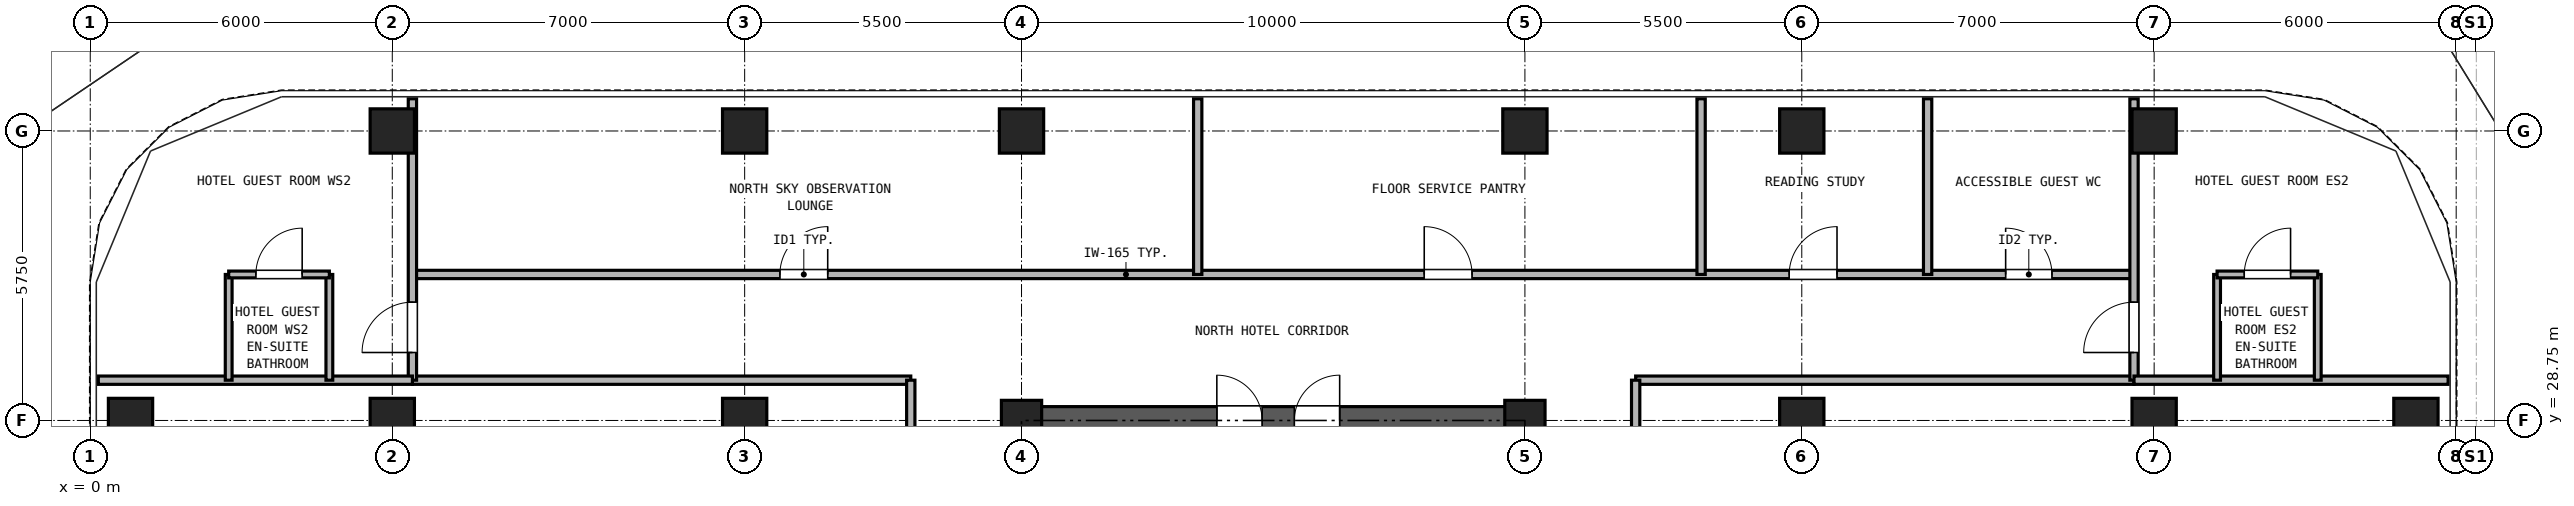
"""IFC4 building model, lengths in metres.
Left out: names, types, materials, properties, quantities, classifications, styles, units other than length and angle.
Written with IfcOpenShell. Run it as: python <this file> out.ifc"""

import sys

from ifc_helpers import new_model, si_unit, direction, frame, frame_2d, origin, origin_2d, place, context, subcontext, project, spatial, rectangle, hollow_rectangle, extrude, source, transform, mapped, element, fill, save


model = new_model("IFC4")
c1 = context("Model", 3, precision=1e-05, world=origin(), true_north=direction((0.0, 1.0)))
c2 = subcontext(c1, "Body", "Model", "MODEL_VIEW")
j1 = project(units=[si_unit("LENGTHUNIT", "METRE"), si_unit("PLANEANGLEUNIT", "RADIAN")], contexts=[c1])
p1 = place(None, origin())
s1 = spatial("IfcSite", under=j1, at=p1, CompositionType="ELEMENT")
p2 = place(p1, origin())
s2 = spatial("IfcBuilding", under=s1, at=p2, CompositionType="ELEMENT")
p3 = place(p2, frame((0.0, 0.0, 105.5)))
s3 = spatial("IfcBuildingStorey", under=s2, at=p3, CompositionType="ELEMENT", Elevation=105.5)
m1 = source(origin(), c2, "Body", "SweptSolid", [
    extrude(hollow_rectangle(XDim=0.88, YDim=0.88, WallThickness=0.05, at=origin_2d()), origin(), (0.0, 0.0, 1.0), 2.95),
])
for number, where, z_axis, x_axis in (
    (1, (6.0, 34.5, 0.0), (0.0, 0.0, 1.0), (1.0, 0.0, 0.0)),
    (2, (13.0, 34.5, 0.0), (0.0, 0.0, 1.0), (1.0, 0.0, 0.0)),
    (3, (18.5, 34.5, 0.0), (0.0, 0.0, 1.0), (1.0, 0.0, 0.0)),
    (4, (28.5, 34.5, 0.0), (0.0, 0.0, 1.0), (1.0, 0.0, 0.0)),
    (5, (34.0, 34.5, 0.0), (0.0, 0.0, 1.0), (1.0, 0.0, 0.0)),
    (6, (41.0, 34.5, 0.0), (0.0, 0.0, 1.0), (1.0, 0.0, 0.0)),
    (7, (0.8, 28.75, 0.0), (0.0, 0.0, 1.0), (1.0, 0.0, 0.0)),
    (8, (46.2, 28.75, 0.0), (0.0, 0.0, 1.0), (1.0, 0.0, 0.0)),
    (9, (6.0, 28.75, 0.0), (0.0, 0.0, 1.0), (1.0, 0.0, 0.0)),
    (10, (13.0, 28.75, 0.0), (0.0, 0.0, 1.0), (1.0, 0.0, 0.0)),
):
    element("IfcColumn", number, at=place(p3, frame(where, z_axis=z_axis, x_axis=x_axis)), inside=s3, PredefinedType="COLUMN", context=c2, shape_type="MappedRepresentation", body=[
        mapped(m1, transform((0.0, 0.0, 0.0), x_axis=(1.0, 0.0, 0.0), y_axis=(0.0, 1.0, 0.0), z_axis=(0.0, 0.0, 1.0), scale=1.0)),
    ])
m2 = source(origin(), c2, "Body", "SweptSolid", [
    extrude(hollow_rectangle(XDim=0.8, YDim=0.8, WallThickness=0.045, at=origin_2d()), origin(), (0.0, 0.0, 1.0), 2.95),
])
for number, where, z_axis, x_axis in (
    (11, (18.5, 28.75, 0.0), (0.0, 0.0, 1.0), (1.0, 0.0, 0.0)),
    (12, (28.5, 28.75, 0.0), (0.0, 0.0, 1.0), (1.0, 0.0, 0.0)),
):
    element("IfcColumn", number, at=place(p3, frame(where, z_axis=z_axis, x_axis=x_axis)), inside=s3, PredefinedType="COLUMN", context=c2, shape_type="MappedRepresentation", body=[
        mapped(m2, transform((0.0, 0.0, 0.0), x_axis=(1.0, 0.0, 0.0), y_axis=(0.0, 1.0, 0.0), z_axis=(0.0, 0.0, 1.0), scale=1.0)),
    ])
for number, where, z_axis, x_axis in (
    (13, (34.0, 28.75, 0.0), (0.0, 0.0, 1.0), (1.0, 0.0, 0.0)),
    (14, (41.0, 28.75, 0.0), (0.0, 0.0, 1.0), (1.0, 0.0, 0.0)),
):
    element("IfcColumn", number, at=place(p3, frame(where, z_axis=z_axis, x_axis=x_axis)), inside=s3, PredefinedType="COLUMN", context=c2, shape_type="MappedRepresentation", body=[
        mapped(m1, transform((0.0, 0.0, 0.0), x_axis=(1.0, 0.0, 0.0), y_axis=(0.0, 1.0, 0.0), z_axis=(0.0, 0.0, 1.0), scale=1.0)),
    ])
p4 = place(p3, frame((18.225, 28.75, 0.0), z_axis=(0.0, 0.0, 1.0), x_axis=(1.0, 0.0, 0.0)))
e15 = element("IfcWall", 15, at=p4, inside=s3, PredefinedType="SHEAR", context=c2, shape_type="SweptSolid", body=[
    extrude(rectangle(XDim=10.55, YDim=0.55, at=frame_2d((5.275, 0.0))), origin(), (0.0, 0.0, 1.0), 2.95),
])
p5 = place(p4, frame((4.155, 0.0, 0.0)))
e16 = element("IfcOpeningElement", 16, at=p5, cuts=e15, PredefinedType="OPENING", context=c2, shape_type="SweptSolid", body=[
    extrude(rectangle(XDim=0.9, YDim=2.05, at=frame_2d((0.45, 1.025))), frame((0.0, 0.285, 0.0), z_axis=(0.0, -1.0, 0.0), x_axis=(1.0, 0.0, 0.0)), (0.0, 0.0, 1.0), 0.57),
])
p6 = place(p4, frame((5.695, 0.0, 0.0)))
e17 = element("IfcOpeningElement", 17, at=p6, cuts=e15, PredefinedType="OPENING", context=c2, shape_type="SweptSolid", body=[
    extrude(rectangle(XDim=0.9, YDim=2.05, at=frame_2d((0.45, 1.025))), frame((0.0, 0.285, 0.0), z_axis=(0.0, -1.0, 0.0), x_axis=(1.0, 0.0, 0.0)), (0.0, 0.0, 1.0), 0.57),
])
p7 = place(p3, frame((6.4, 31.65, 0.0), z_axis=(0.0, 0.0, 1.0), x_axis=(1.0, 0.0, 0.0)))
e18 = element("IfcWall", 18, at=p7, inside=s3, PredefinedType="PARTITIONING", context=c2, shape_type="SweptSolid", body=[
    extrude(rectangle(XDim=34.2, YDim=0.165, at=frame_2d((17.1, 0.0))), origin(), (0.0, 0.0, 1.0), 2.583),
])
p8 = place(p7, frame((7.3, 0.0, 0.0)))
e19 = element("IfcOpeningElement", 19, at=p8, cuts=e18, PredefinedType="OPENING", context=c2, shape_type="SweptSolid", body=[
    extrude(rectangle(XDim=0.95, YDim=2.15, at=frame_2d((0.475, 1.075))), frame((0.0, 0.093, 0.0), z_axis=(0.0, -1.0, 0.0), x_axis=(1.0, 0.0, 0.0)), (0.0, 0.0, 1.0), 0.185),
])
p9 = place(p7, frame((20.1, 0.0, 0.0)))
e20 = element("IfcOpeningElement", 20, at=p9, cuts=e18, PredefinedType="OPENING", context=c2, shape_type="SweptSolid", body=[
    extrude(rectangle(XDim=0.95, YDim=2.15, at=frame_2d((0.475, 1.075))), frame((0.0, 0.093, 0.0), z_axis=(0.0, -1.0, 0.0), x_axis=(1.0, 0.0, 0.0)), (0.0, 0.0, 1.0), 0.185),
])
p10 = place(p7, frame((27.35, 0.0, 0.0)))
e21 = element("IfcOpeningElement", 21, at=p10, cuts=e18, PredefinedType="OPENING", context=c2, shape_type="SweptSolid", body=[
    extrude(rectangle(XDim=0.95, YDim=2.15, at=frame_2d((0.475, 1.075))), frame((0.0, 0.093, 0.0), z_axis=(0.0, -1.0, 0.0), x_axis=(1.0, 0.0, 0.0)), (0.0, 0.0, 1.0), 0.185),
])
p11 = place(p7, frame((31.65, 0.0, 0.0)))
e22 = element("IfcOpeningElement", 22, at=p11, cuts=e18, PredefinedType="OPENING", context=c2, shape_type="SweptSolid", body=[
    extrude(rectangle(XDim=0.92, YDim=2.1, at=frame_2d((0.46, 1.05))), frame((0.0, 0.093, 0.0), z_axis=(0.0, -1.0, 0.0), x_axis=(1.0, 0.0, 0.0)), (0.0, 0.0, 1.0), 0.185),
])
for number, where, z_axis, x_axis in (
    (23, (6.4, 29.55, 0.0), (0.0, 0.0, 1.0), (1.0, 0.0, 0.0)),
    (24, (30.7, 29.55, 0.0), (0.0, 0.0, 1.0), (1.0, 0.0, 0.0)),
):
    element("IfcWall", number, at=place(p3, frame(where, z_axis=z_axis, x_axis=x_axis)), inside=s3, PredefinedType="PARTITIONING", context=c2, shape_type="SweptSolid", body=[
        extrude(rectangle(XDim=9.9, YDim=0.165, at=frame_2d((4.95, 0.0))), origin(), (0.0, 0.0, 1.0), 2.95),
    ])
p12 = place(p3, frame((16.3, 11.1, 0.0), z_axis=(0.0, 0.0, 1.0), x_axis=(0.0, 1.0, 0.0)))
e25 = element("IfcWall", 25, at=p12, inside=s3, PredefinedType="PARTITIONING", context=c2, shape_type="SweptSolid", body=[
    extrude(rectangle(XDim=18.45, YDim=0.165, at=frame_2d((9.225, 0.0))), origin(), (0.0, 0.0, 1.0), 2.95),
])
p13 = place(p12, frame((2.5, 0.0, 0.0)))
e26 = element("IfcOpeningElement", 26, at=p13, cuts=e25, PredefinedType="OPENING", context=c2, shape_type="SweptSolid", body=[
    extrude(rectangle(XDim=0.95, YDim=2.15, at=frame_2d((0.475, 1.075))), frame((0.0, 0.093, 0.0), z_axis=(0.0, -1.0, 0.0), x_axis=(1.0, 0.0, 0.0)), (0.0, 0.0, 1.0), 0.185),
])
p14 = place(p12, frame((8.5, 0.0, 0.0)))
e27 = element("IfcOpeningElement", 27, at=p14, cuts=e25, PredefinedType="OPENING", context=c2, shape_type="SweptSolid", body=[
    extrude(rectangle(XDim=0.95, YDim=2.15, at=frame_2d((0.475, 1.075))), frame((0.0, 0.093, 0.0), z_axis=(0.0, -1.0, 0.0), x_axis=(1.0, 0.0, 0.0)), (0.0, 0.0, 1.0), 0.185),
])
p15 = place(p12, frame((14.725, 0.0, 0.0)))
e28 = element("IfcOpeningElement", 28, at=p15, cuts=e25, PredefinedType="OPENING", context=c2, shape_type="SweptSolid", body=[
    extrude(rectangle(XDim=0.95, YDim=2.15, at=frame_2d((0.475, 1.075))), frame((0.0, 0.093, 0.0), z_axis=(0.0, -1.0, 0.0), x_axis=(1.0, 0.0, 0.0)), (0.0, 0.0, 1.0), 0.185),
])
p16 = place(p3, frame((30.7, 11.1, 0.0), z_axis=(0.0, 0.0, 1.0), x_axis=(0.0, 1.0, 0.0)))
e29 = element("IfcWall", 29, at=p16, inside=s3, PredefinedType="PARTITIONING", context=c2, shape_type="SweptSolid", body=[
    extrude(rectangle(XDim=18.45, YDim=0.165, at=frame_2d((9.225, 0.0))), origin(), (0.0, 0.0, 1.0), 2.95),
])
p17 = place(p16, frame((4.112, 0.0, 0.0)))
e30 = element("IfcOpeningElement", 30, at=p17, cuts=e29, PredefinedType="OPENING", context=c2, shape_type="SweptSolid", body=[
    extrude(rectangle(XDim=0.95, YDim=2.15, at=frame_2d((0.475, 1.075))), frame((0.0, 0.093, 0.0), z_axis=(0.0, -1.0, 0.0), x_axis=(1.0, 0.0, 0.0)), (0.0, 0.0, 1.0), 0.185),
])
p18 = place(p16, frame((13.338, 0.0, 0.0)))
e31 = element("IfcOpeningElement", 31, at=p18, cuts=e29, PredefinedType="OPENING", context=c2, shape_type="SweptSolid", body=[
    extrude(rectangle(XDim=0.95, YDim=2.15, at=frame_2d((0.475, 1.075))), frame((0.0, 0.093, 0.0), z_axis=(0.0, -1.0, 0.0), x_axis=(1.0, 0.0, 0.0)), (0.0, 0.0, 1.0), 0.185),
])
p19 = place(p3, frame((6.4, 29.55, 0.0), z_axis=(0.0, 0.0, 1.0), x_axis=(0.0, 1.0, 0.0)))
e32 = element("IfcWall", 32, at=p19, inside=s3, PredefinedType="PARTITIONING", context=c2, shape_type="SweptSolid", body=[
    extrude(rectangle(XDim=5.59, YDim=0.165, at=frame_2d((2.795, 0.0))), origin(), (0.0, 0.0, 1.0), 2.95),
])
p20 = place(p19, frame((0.55, 0.0, 0.0)))
e33 = element("IfcOpeningElement", 33, at=p20, cuts=e32, PredefinedType="OPENING", context=c2, shape_type="SweptSolid", body=[
    extrude(rectangle(XDim=1.0, YDim=2.15, at=frame_2d((0.5, 1.075))), frame((0.0, 0.093, 0.0), z_axis=(0.0, -1.0, 0.0), x_axis=(1.0, 0.0, 0.0)), (0.0, 0.0, 1.0), 0.185),
])
p21 = place(p3, frame((40.6, 29.55, 0.0), z_axis=(0.0, 0.0, 1.0), x_axis=(0.0, 1.0, 0.0)))
e34 = element("IfcWall", 34, at=p21, inside=s3, PredefinedType="PARTITIONING", context=c2, shape_type="SweptSolid", body=[
    extrude(rectangle(XDim=5.59, YDim=0.165, at=frame_2d((2.795, 0.0))), origin(), (0.0, 0.0, 1.0), 2.95),
])
p22 = place(p21, frame((0.55, 0.0, 0.0)))
e35 = element("IfcOpeningElement", 35, at=p22, cuts=e34, PredefinedType="OPENING", context=c2, shape_type="SweptSolid", body=[
    extrude(rectangle(XDim=1.0, YDim=2.15, at=frame_2d((0.5, 1.075))), frame((0.0, 0.093, 0.0), z_axis=(0.0, -1.0, 0.0), x_axis=(1.0, 0.0, 0.0)), (0.0, 0.0, 1.0), 0.185),
])
for number, where, z_axis, x_axis in (
    (36, (0.16, 29.55, 0.0), (0.0, 0.0, 1.0), (1.0, 0.0, 0.0)),
    (37, (40.6, 29.55, 0.0), (0.0, 0.0, 1.0), (1.0, 0.0, 0.0)),
):
    element("IfcWall", number, at=place(p3, frame(where, z_axis=z_axis, x_axis=x_axis)), inside=s3, PredefinedType="PARTITIONING", context=c2, shape_type="SweptSolid", body=[
        extrude(rectangle(XDim=6.24, YDim=0.165, at=frame_2d((3.12, 0.0))), origin(), (0.0, 0.0, 1.0), 2.95),
    ])
for number, where, z_axis, x_axis in (
    (38, (2.75, 29.55, 0.0), (0.0, 0.0, 1.0), (0.0, 1.0, 0.0)),
    (39, (4.75, 29.55, 0.0), (0.0, 0.0, 1.0), (0.0, 1.0, 0.0)),
):
    element("IfcWall", number, at=place(p3, frame(where, z_axis=z_axis, x_axis=x_axis)), inside=s3, PredefinedType="PARTITIONING", context=c2, shape_type="SweptSolid", body=[
        extrude(rectangle(XDim=2.1, YDim=0.135, at=frame_2d((1.05, 0.0))), origin(), (0.0, 0.0, 1.0), 2.95),
    ])
p23 = place(p3, frame((2.75, 31.65, 0.0), z_axis=(0.0, 0.0, 1.0), x_axis=(1.0, 0.0, 0.0)))
e40 = element("IfcWall", 40, at=p23, inside=s3, PredefinedType="PARTITIONING", context=c2, shape_type="SweptSolid", body=[
    extrude(rectangle(XDim=2.0, YDim=0.135, at=frame_2d((1.0, 0.0))), origin(), (0.0, 0.0, 1.0), 2.95),
])
p24 = place(p23, frame((0.54, 0.0, 0.0)))
e41 = element("IfcOpeningElement", 41, at=p24, cuts=e40, PredefinedType="OPENING", context=c2, shape_type="SweptSolid", body=[
    extrude(rectangle(XDim=0.92, YDim=2.1, at=frame_2d((0.46, 1.05))), frame((0.0, 0.077, 0.0), z_axis=(0.0, -1.0, 0.0), x_axis=(1.0, 0.0, 0.0)), (0.0, 0.0, 1.0), 0.155),
])
for number, where, z_axis, x_axis in (
    (42, (42.25, 29.55, 0.0), (0.0, 0.0, 1.0), (0.0, 1.0, 0.0)),
    (43, (44.25, 29.55, 0.0), (0.0, 0.0, 1.0), (0.0, 1.0, 0.0)),
):
    element("IfcWall", number, at=place(p3, frame(where, z_axis=z_axis, x_axis=x_axis)), inside=s3, PredefinedType="PARTITIONING", context=c2, shape_type="SweptSolid", body=[
        extrude(rectangle(XDim=2.1, YDim=0.135, at=frame_2d((1.05, 0.0))), origin(), (0.0, 0.0, 1.0), 2.95),
    ])
p25 = place(p3, frame((42.25, 31.65, 0.0), z_axis=(0.0, 0.0, 1.0), x_axis=(1.0, 0.0, 0.0)))
e44 = element("IfcWall", 44, at=p25, inside=s3, PredefinedType="PARTITIONING", context=c2, shape_type="SweptSolid", body=[
    extrude(rectangle(XDim=2.0, YDim=0.135, at=frame_2d((1.0, 0.0))), origin(), (0.0, 0.0, 1.0), 2.95),
])
p26 = place(p25, frame((0.54, 0.0, 0.0)))
e45 = element("IfcOpeningElement", 45, at=p26, cuts=e44, PredefinedType="OPENING", context=c2, shape_type="SweptSolid", body=[
    extrude(rectangle(XDim=0.92, YDim=2.1, at=frame_2d((0.46, 1.05))), frame((0.0, 0.077, 0.0), z_axis=(0.0, -1.0, 0.0), x_axis=(1.0, 0.0, 0.0)), (0.0, 0.0, 1.0), 0.155),
])
for number, where, z_axis, x_axis in (
    (46, (22.0, 31.65, 0.0), (0.0, 0.0, 1.0), (0.0, 1.0, 0.0)),
    (47, (32.0, 31.65, 0.0), (0.0, 0.0, 1.0), (0.0, 1.0, 0.0)),
    (48, (36.5, 31.65, 0.0), (0.0, 0.0, 1.0), (0.0, 1.0, 0.0)),
):
    element("IfcWall", number, at=place(p3, frame(where, z_axis=z_axis, x_axis=x_axis)), inside=s3, PredefinedType="PARTITIONING", context=c2, shape_type="SweptSolid", body=[
        extrude(rectangle(XDim=3.49, YDim=0.165, at=frame_2d((1.745, 0.0))), origin(), (0.0, 0.0, 1.0), 2.95),
    ])
p27 = place(p5, origin())
e49 = element("IfcDoor", 49, at=p27, inside=s3, OperationType="SINGLE_SWING_LEFT", PredefinedType="DOOR", context=c2, shape_type="SweptSolid", body=[
    extrude(rectangle(XDim=0.9, YDim=2.05, at=frame_2d((0.45, 1.025))), frame((0.0, 0.025, 0.0), z_axis=(0.0, -1.0, 0.0), x_axis=(1.0, 0.0, 0.0)), (0.0, 0.0, 1.0), 0.05),
])
fill(e16, e49)
p28 = place(p6, origin())
e50 = element("IfcDoor", 50, at=p28, inside=s3, OperationType="SINGLE_SWING_RIGHT", PredefinedType="DOOR", context=c2, shape_type="SweptSolid", body=[
    extrude(rectangle(XDim=0.9, YDim=2.05, at=frame_2d((0.45, 1.025))), frame((0.0, 0.025, 0.0), z_axis=(0.0, -1.0, 0.0), x_axis=(1.0, 0.0, 0.0)), (0.0, 0.0, 1.0), 0.05),
])
fill(e17, e50)
p29 = place(p24, frame((0.92, 0.0, 0.0), z_axis=(0.0, 0.0, 1.0), x_axis=(-1.0, 0.0, 0.0)))
e51 = element("IfcDoor", 51, at=p29, inside=s3, OperationType="SINGLE_SWING_RIGHT", PredefinedType="DOOR", context=c2, shape_type="SweptSolid", body=[
    extrude(rectangle(XDim=0.92, YDim=2.1, at=frame_2d((0.46, 1.05))), frame((0.0, 0.025, 0.0), z_axis=(0.0, -1.0, 0.0), x_axis=(1.0, 0.0, 0.0)), (0.0, 0.0, 1.0), 0.05),
])
fill(e41, e51)
p30 = place(p20, origin())
e52 = element("IfcDoor", 52, at=p30, inside=s3, OperationType="SINGLE_SWING_LEFT", PredefinedType="DOOR", context=c2, shape_type="SweptSolid", body=[
    extrude(rectangle(XDim=1.0, YDim=2.15, at=frame_2d((0.5, 1.075))), frame((0.0, 0.025, 0.0), z_axis=(0.0, -1.0, 0.0), x_axis=(1.0, 0.0, 0.0)), (0.0, 0.0, 1.0), 0.05),
])
fill(e33, e52)
p31 = place(p26, frame((0.92, 0.0, 0.0), z_axis=(0.0, 0.0, 1.0), x_axis=(-1.0, 0.0, 0.0)))
e53 = element("IfcDoor", 53, at=p31, inside=s3, OperationType="SINGLE_SWING_RIGHT", PredefinedType="DOOR", context=c2, shape_type="SweptSolid", body=[
    extrude(rectangle(XDim=0.92, YDim=2.1, at=frame_2d((0.46, 1.05))), frame((0.0, 0.025, 0.0), z_axis=(0.0, -1.0, 0.0), x_axis=(1.0, 0.0, 0.0)), (0.0, 0.0, 1.0), 0.05),
])
fill(e45, e53)
p32 = place(p22, frame((1.0, 0.0, 0.0), z_axis=(0.0, 0.0, 1.0), x_axis=(-1.0, 0.0, 0.0)))
e54 = element("IfcDoor", 54, at=p32, inside=s3, OperationType="SINGLE_SWING_LEFT", PredefinedType="DOOR", context=c2, shape_type="SweptSolid", body=[
    extrude(rectangle(XDim=1.0, YDim=2.15, at=frame_2d((0.5, 1.075))), frame((0.0, 0.025, 0.0), z_axis=(0.0, -1.0, 0.0), x_axis=(1.0, 0.0, 0.0)), (0.0, 0.0, 1.0), 0.05),
])
fill(e35, e54)
p33 = place(p8, origin())
e55 = element("IfcDoor", 55, at=p33, inside=s3, OperationType="SINGLE_SWING_RIGHT", PredefinedType="DOOR", context=c2, shape_type="SweptSolid", body=[
    extrude(rectangle(XDim=0.95, YDim=2.15, at=frame_2d((0.475, 1.075))), frame((0.0, 0.025, 0.0), z_axis=(0.0, -1.0, 0.0), x_axis=(1.0, 0.0, 0.0)), (0.0, 0.0, 1.0), 0.05),
])
fill(e19, e55)
p34 = place(p9, origin())
e56 = element("IfcDoor", 56, at=p34, inside=s3, OperationType="SINGLE_SWING_LEFT", PredefinedType="DOOR", context=c2, shape_type="SweptSolid", body=[
    extrude(rectangle(XDim=0.95, YDim=2.15, at=frame_2d((0.475, 1.075))), frame((0.0, 0.025, 0.0), z_axis=(0.0, -1.0, 0.0), x_axis=(1.0, 0.0, 0.0)), (0.0, 0.0, 1.0), 0.05),
])
fill(e20, e56)
p35 = place(p10, origin())
e57 = element("IfcDoor", 57, at=p35, inside=s3, OperationType="SINGLE_SWING_RIGHT", PredefinedType="DOOR", context=c2, shape_type="SweptSolid", body=[
    extrude(rectangle(XDim=0.95, YDim=2.15, at=frame_2d((0.475, 1.075))), frame((0.0, 0.025, 0.0), z_axis=(0.0, -1.0, 0.0), x_axis=(1.0, 0.0, 0.0)), (0.0, 0.0, 1.0), 0.05),
])
fill(e21, e57)
p36 = place(p11, origin())
e58 = element("IfcDoor", 58, at=p36, inside=s3, OperationType="SINGLE_SWING_LEFT", PredefinedType="DOOR", context=c2, shape_type="SweptSolid", body=[
    extrude(rectangle(XDim=0.92, YDim=2.1, at=frame_2d((0.46, 1.05))), frame((0.0, 0.025, 0.0), z_axis=(0.0, -1.0, 0.0), x_axis=(1.0, 0.0, 0.0)), (0.0, 0.0, 1.0), 0.05),
])
fill(e22, e58)
save(model, sys.argv[1])
